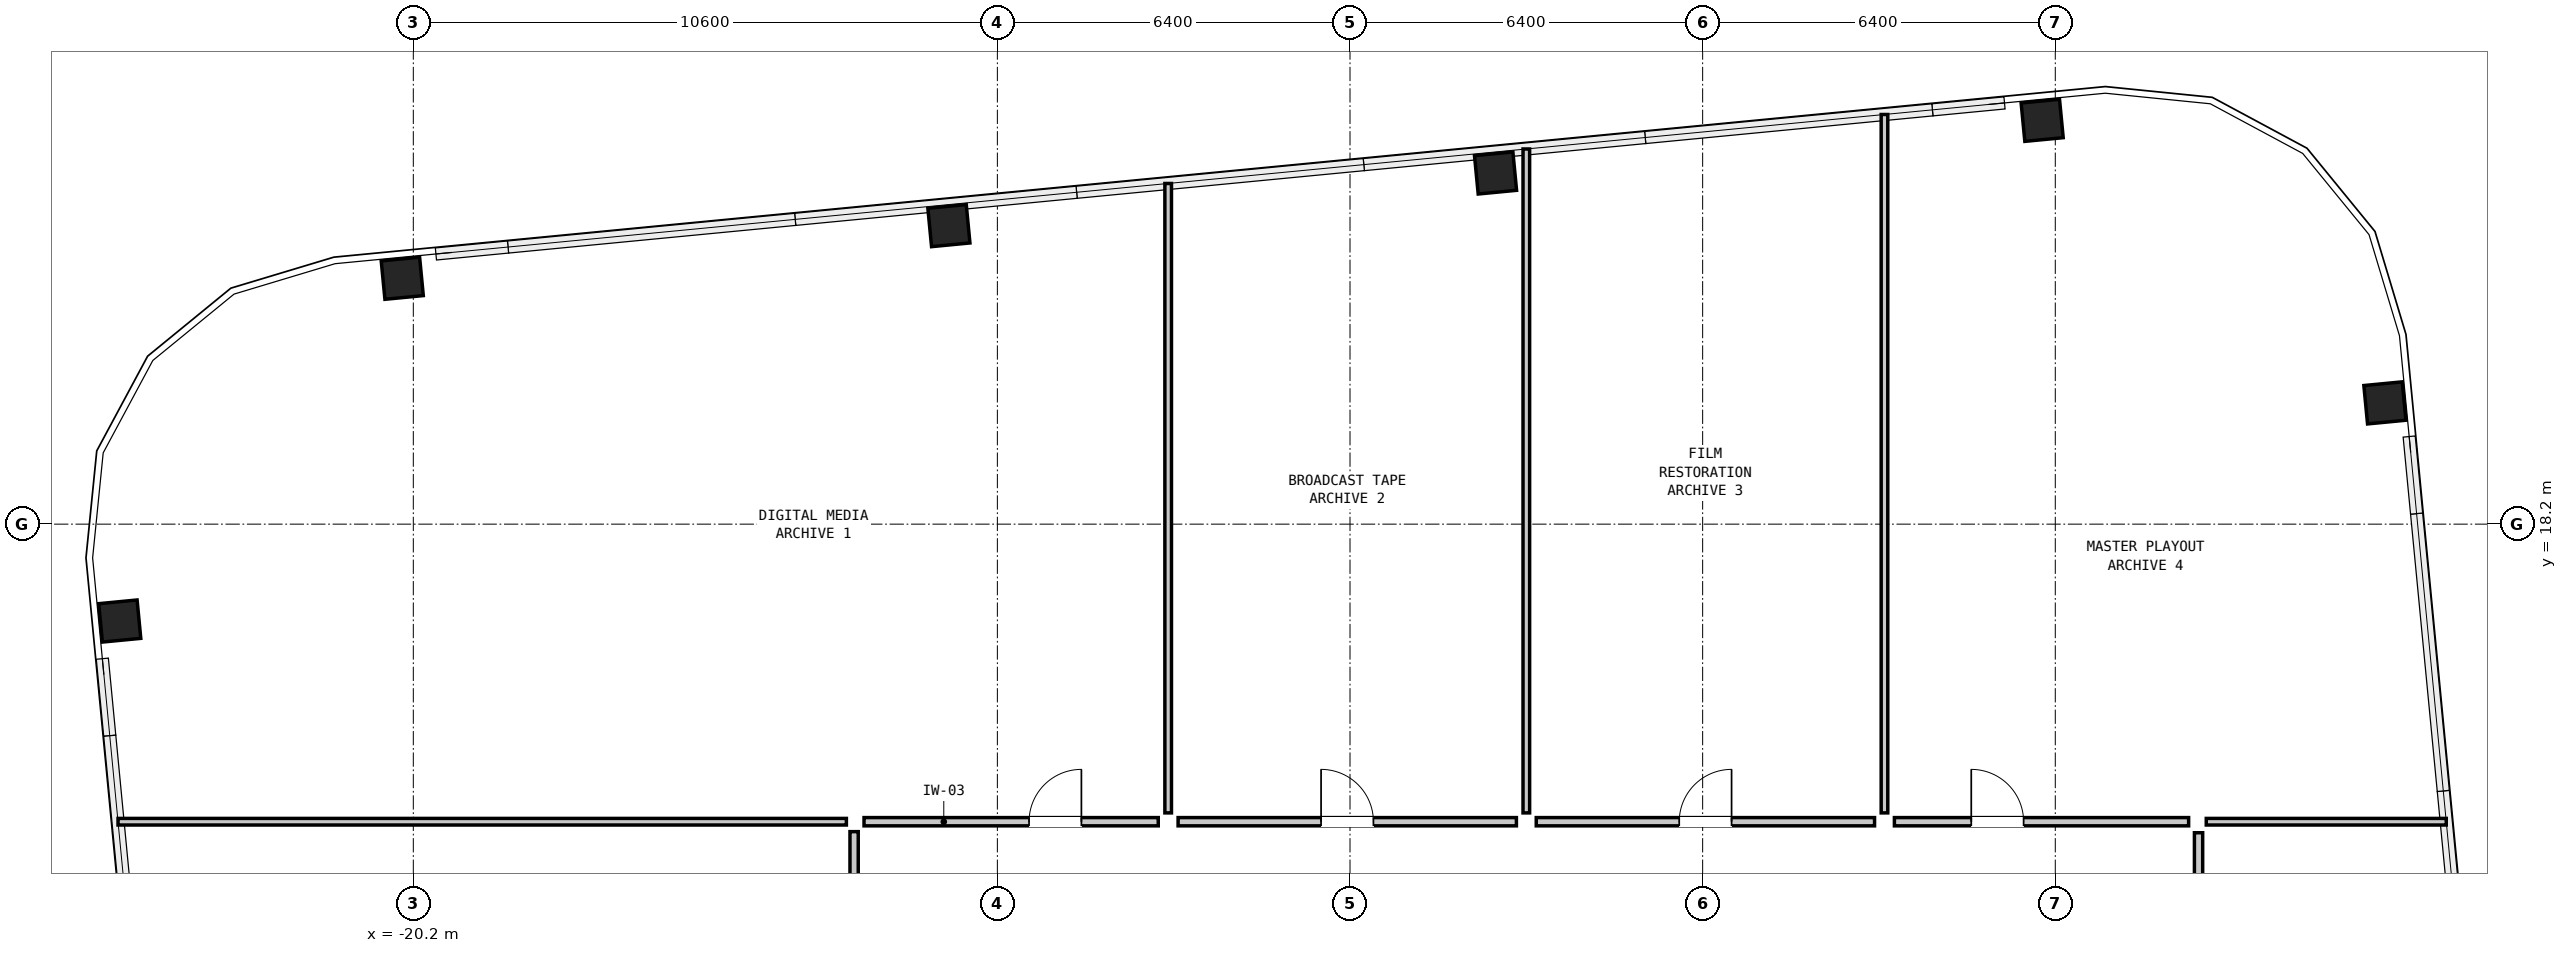
"""IFC4 building model, lengths in metres.
Left out: names, types, materials, properties, quantities, classifications, styles, units other than length and angle.
Written with IfcOpenShell. Run it as: python <this file> out.ifc"""

import sys

from ifc_helpers import new_model, si_unit, direction, frame, frame_2d, origin, origin_2d, place, context, subcontext, project, spatial, rectangle, hollow_rectangle, extrude, element, fill, save


model = new_model("IFC4")
c1 = context("Model", 3, precision=1e-05, world=origin(), true_north=direction((0.0, 1.0)))
c2 = subcontext(c1, "Body", "Model", "MODEL_VIEW")
j1 = project(units=[si_unit("LENGTHUNIT", "METRE"), si_unit("PLANEANGLEUNIT", "RADIAN")], contexts=[c1])
p1 = place(None, origin())
s1 = spatial("IfcSite", under=j1, at=p1, CompositionType="ELEMENT")
p2 = place(p1, origin())
s2 = spatial("IfcBuilding", under=s1, at=p2, CompositionType="ELEMENT")
p3 = place(p2, frame((0.0, 0.0, 177.5)))
s3 = spatial("IfcBuildingStorey", under=s2, at=p3, CompositionType="ELEMENT", Elevation=177.5)
for number, where, z_axis, x_axis in (
    (1, (15.582, 20.4, 0.0), (0.0, 0.0, 1.0), (-0.096, 0.995, 0.0)),
    (2, (9.362, 25.528, 0.0), (0.0, 0.0, 1.0), (0.995, 0.096, 0.0)),
    (3, (-0.559, 24.573, 0.0), (0.0, 0.0, 1.0), (0.995, 0.096, 0.0)),
    (4, (-10.479, 23.617, 0.0), (0.0, 0.0, 1.0), (0.995, 0.096, 0.0)),
    (5, (-20.4, 22.662, 0.0), (0.0, 0.0, 1.0), (0.995, 0.096, 0.0)),
    (6, (-25.528, 16.442, 0.0), (0.0, 0.0, 1.0), (-0.096, 0.995, 0.0)),
):
    element("IfcColumn", number, at=place(p3, frame(where, z_axis=z_axis, x_axis=x_axis)), inside=s3, PredefinedType="COLUMN", context=c2, shape_type="SweptSolid", body=[
        extrude(hollow_rectangle(XDim=0.7, YDim=0.7, WallThickness=0.045, at=origin_2d()), origin(), (0.0, 0.0, 1.0), 3.05),
    ])
p4 = place(p3, frame((-25.559, 12.8, 0.0), z_axis=(0.0, 0.0, 1.0), x_axis=(1.0, 0.0, 0.0)))
e7 = element("IfcWall", 7, at=p4, inside=s3, PredefinedType="PARTITIONING", context=c2, shape_type="SweptSolid", body=[
    extrude(rectangle(XDim=13.219, YDim=0.12, at=frame_2d((6.609, 0.0))), origin(), (0.0, 0.0, 1.0), 2.83),
])
p5 = place(p3, frame((12.34, 12.8, 0.0), z_axis=(0.0, 0.0, 1.0), x_axis=(1.0, 0.0, 0.0)))
e8 = element("IfcWall", 8, at=p5, inside=s3, PredefinedType="PARTITIONING", context=c2, shape_type="SweptSolid", body=[
    extrude(rectangle(XDim=4.355, YDim=0.12, at=frame_2d((2.178, 0.0))), origin(), (0.0, 0.0, 1.0), 2.83),
])
p6 = place(p3, frame((-6.5, 12.96, 0.0), z_axis=(0.0, 0.0, 1.0), x_axis=(0.0, 1.0, 0.0)))
e9 = element("IfcWall", 9, at=p6, inside=s3, PredefinedType="PARTITIONING", context=c2, shape_type="SweptSolid", body=[
    extrude(rectangle(XDim=11.422, YDim=0.12, at=frame_2d((5.711, 0.0))), origin(), (0.0, 0.0, 1.0), 2.347),
])
p7 = place(p3, frame((0.0, 12.96, 0.0), z_axis=(0.0, 0.0, 1.0), x_axis=(0.0, 1.0, 0.0)))
e10 = element("IfcWall", 10, at=p7, inside=s3, PredefinedType="PARTITIONING", context=c2, shape_type="SweptSolid", body=[
    extrude(rectangle(XDim=12.048, YDim=0.12, at=frame_2d((6.024, 0.0))), origin(), (0.0, 0.0, 1.0), 2.347),
])
p8 = place(p3, frame((6.5, 12.96, 0.0), z_axis=(0.0, 0.0, 1.0), x_axis=(0.0, 1.0, 0.0)))
e11 = element("IfcWall", 11, at=p8, inside=s3, PredefinedType="PARTITIONING", context=c2, shape_type="SweptSolid", body=[
    extrude(rectangle(XDim=12.674, YDim=0.12, at=frame_2d((6.337, 0.0))), origin(), (0.0, 0.0, 1.0), 2.347),
])
p9 = place(p3, frame((-12.02, 12.8, 0.0), z_axis=(0.0, 0.0, 1.0), x_axis=(1.0, 0.0, 0.0)))
e12 = element("IfcWall", 12, at=p9, inside=s3, PredefinedType="PARTITIONING", context=c2, shape_type="SweptSolid", body=[
    extrude(rectangle(XDim=5.34, YDim=0.15, at=frame_2d((2.67, 0.0))), origin(), (0.0, 0.0, 1.0), 2.83),
])
p10 = place(p9, frame((2.995, 0.0, 0.0)))
e13 = element("IfcOpeningElement", 13, at=p10, cuts=e12, PredefinedType="OPENING", context=c2, shape_type="SweptSolid", body=[
    extrude(rectangle(XDim=0.95, YDim=2.1, at=frame_2d((0.475, 1.05))), frame((0.0, 0.087, 0.0), z_axis=(0.0, -1.0, 0.0), x_axis=(1.0, 0.0, 0.0)), (0.0, 0.0, 1.0), 0.174),
])
p11 = place(p3, frame((-6.32, 12.8, 0.0), z_axis=(0.0, 0.0, 1.0), x_axis=(1.0, 0.0, 0.0)))
e14 = element("IfcWall", 14, at=p11, inside=s3, PredefinedType="PARTITIONING", context=c2, shape_type="SweptSolid", body=[
    extrude(rectangle(XDim=6.14, YDim=0.15, at=frame_2d((3.07, 0.0))), origin(), (0.0, 0.0, 1.0), 2.83),
])
p12 = place(p11, frame((2.595, 0.0, 0.0)))
e15 = element("IfcOpeningElement", 15, at=p12, cuts=e14, PredefinedType="OPENING", context=c2, shape_type="SweptSolid", body=[
    extrude(rectangle(XDim=0.95, YDim=2.1, at=frame_2d((0.475, 1.05))), frame((0.0, 0.087, 0.0), z_axis=(0.0, -1.0, 0.0), x_axis=(1.0, 0.0, 0.0)), (0.0, 0.0, 1.0), 0.174),
])
p13 = place(p3, frame((0.18, 12.8, 0.0), z_axis=(0.0, 0.0, 1.0), x_axis=(1.0, 0.0, 0.0)))
e16 = element("IfcWall", 16, at=p13, inside=s3, PredefinedType="PARTITIONING", context=c2, shape_type="SweptSolid", body=[
    extrude(rectangle(XDim=6.14, YDim=0.15, at=frame_2d((3.07, 0.0))), origin(), (0.0, 0.0, 1.0), 2.83),
])
p14 = place(p13, frame((2.595, 0.0, 0.0)))
e17 = element("IfcOpeningElement", 17, at=p14, cuts=e16, PredefinedType="OPENING", context=c2, shape_type="SweptSolid", body=[
    extrude(rectangle(XDim=0.95, YDim=2.1, at=frame_2d((0.475, 1.05))), frame((0.0, 0.087, 0.0), z_axis=(0.0, -1.0, 0.0), x_axis=(1.0, 0.0, 0.0)), (0.0, 0.0, 1.0), 0.174),
])
p15 = place(p3, frame((6.68, 12.8, 0.0), z_axis=(0.0, 0.0, 1.0), x_axis=(1.0, 0.0, 0.0)))
e18 = element("IfcWall", 18, at=p15, inside=s3, PredefinedType="PARTITIONING", context=c2, shape_type="SweptSolid", body=[
    extrude(rectangle(XDim=5.34, YDim=0.15, at=frame_2d((2.67, 0.0))), origin(), (0.0, 0.0, 1.0), 2.83),
])
p16 = place(p15, frame((1.395, 0.0, 0.0)))
e19 = element("IfcOpeningElement", 19, at=p16, cuts=e18, PredefinedType="OPENING", context=c2, shape_type="SweptSolid", body=[
    extrude(rectangle(XDim=0.95, YDim=2.1, at=frame_2d((0.475, 1.05))), frame((0.0, 0.087, 0.0), z_axis=(0.0, -1.0, 0.0), x_axis=(1.0, 0.0, 0.0)), (0.0, 0.0, 1.0), 0.174),
])
p17 = place(p3, frame((-12.2, 3.68, 0.0), z_axis=(0.0, 0.0, 1.0), x_axis=(0.0, 1.0, 0.0)))
e20 = element("IfcWall", 20, at=p17, inside=s3, PredefinedType="PARTITIONING", context=c2, shape_type="SweptSolid", body=[
    extrude(rectangle(XDim=8.94, YDim=0.15, at=frame_2d((4.47, 0.0))), origin(), (0.0, 0.0, 1.0), 2.83),
])
p18 = place(p17, frame((3.995, 0.0, 0.0)))
e21 = element("IfcOpeningElement", 21, at=p18, cuts=e20, PredefinedType="OPENING", context=c2, shape_type="SweptSolid", body=[
    extrude(rectangle(XDim=0.95, YDim=2.1, at=frame_2d((0.475, 1.05))), frame((0.0, 0.087, 0.0), z_axis=(0.0, -1.0, 0.0), x_axis=(1.0, 0.0, 0.0)), (0.0, 0.0, 1.0), 0.174),
])
p19 = place(p3, frame((12.2, 3.8, 0.0), z_axis=(0.0, 0.0, 1.0), x_axis=(0.0, 1.0, 0.0)))
e22 = element("IfcWall", 22, at=p19, inside=s3, PredefinedType="PARTITIONING", context=c2, shape_type="SweptSolid", body=[
    extrude(rectangle(XDim=8.8, YDim=0.15, at=frame_2d((4.4, 0.0))), origin(), (0.0, 0.0, 1.0), 2.83),
])
p20 = place(p19, frame((3.925, 0.0, 0.0)))
e23 = element("IfcOpeningElement", 23, at=p20, cuts=e22, PredefinedType="OPENING", context=c2, shape_type="SweptSolid", body=[
    extrude(rectangle(XDim=0.95, YDim=2.1, at=frame_2d((0.475, 1.05))), frame((0.0, 0.087, 0.0), z_axis=(0.0, -1.0, 0.0), x_axis=(1.0, 0.0, 0.0)), (0.0, 0.0, 1.0), 0.174),
])
p21 = place(p10, origin())
e24 = element("IfcDoor", 24, at=p21, inside=s3, OperationType="SINGLE_SWING_RIGHT", PredefinedType="DOOR", context=c2, shape_type="SweptSolid", body=[
    extrude(rectangle(XDim=0.95, YDim=2.1, at=frame_2d((0.475, 1.05))), frame((0.0, 0.025, 0.0), z_axis=(0.0, -1.0, 0.0), x_axis=(1.0, 0.0, 0.0)), (0.0, 0.0, 1.0), 0.05),
])
fill(e13, e24)
p22 = place(p12, origin())
e25 = element("IfcDoor", 25, at=p22, inside=s3, OperationType="SINGLE_SWING_LEFT", PredefinedType="DOOR", context=c2, shape_type="SweptSolid", body=[
    extrude(rectangle(XDim=0.95, YDim=2.1, at=frame_2d((0.475, 1.05))), frame((0.0, 0.025, 0.0), z_axis=(0.0, -1.0, 0.0), x_axis=(1.0, 0.0, 0.0)), (0.0, 0.0, 1.0), 0.05),
])
fill(e15, e25)
p23 = place(p14, origin())
e26 = element("IfcDoor", 26, at=p23, inside=s3, OperationType="SINGLE_SWING_RIGHT", PredefinedType="DOOR", context=c2, shape_type="SweptSolid", body=[
    extrude(rectangle(XDim=0.95, YDim=2.1, at=frame_2d((0.475, 1.05))), frame((0.0, 0.025, 0.0), z_axis=(0.0, -1.0, 0.0), x_axis=(1.0, 0.0, 0.0)), (0.0, 0.0, 1.0), 0.05),
])
fill(e17, e26)
p24 = place(p16, origin())
e27 = element("IfcDoor", 27, at=p24, inside=s3, OperationType="SINGLE_SWING_LEFT", PredefinedType="DOOR", context=c2, shape_type="SweptSolid", body=[
    extrude(rectangle(XDim=0.95, YDim=2.1, at=frame_2d((0.475, 1.05))), frame((0.0, 0.025, 0.0), z_axis=(0.0, -1.0, 0.0), x_axis=(1.0, 0.0, 0.0)), (0.0, 0.0, 1.0), 0.05),
])
fill(e19, e27)
save(model, sys.argv[1])
